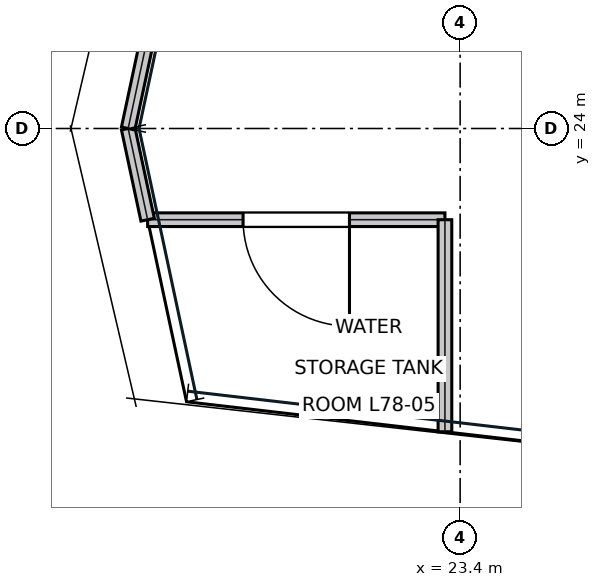
"""IFC4 building model, lengths in metres.
Left out: names, types, materials, properties, quantities, classifications, styles, units other than length and angle.
Written with IfcOpenShell. Run it as: python <this file> out.ifc"""

import sys

from ifc_helpers import new_model, si_unit, direction, frame, frame_2d, origin, place, context, subcontext, project, spatial, rectangle, extrude, element, fill, save


model = new_model("IFC4")
c1 = context("Model", 3, precision=1e-05, world=origin(), true_north=direction((0.0, 1.0)))
c2 = subcontext(c1, "Body", "Model", "MODEL_VIEW")
j1 = project(units=[si_unit("LENGTHUNIT", "METRE"), si_unit("PLANEANGLEUNIT", "RADIAN")], contexts=[c1])
p1 = place(None, origin())
s1 = spatial("IfcSite", under=j1, at=p1, CompositionType="ELEMENT")
p2 = place(p1, origin())
s2 = spatial("IfcBuilding", under=s1, at=p2, CompositionType="ELEMENT")
p3 = place(p2, frame((0.0, 0.0, 332.4)))
s3 = spatial("IfcBuildingStorey", under=s2, at=p3, CompositionType="ELEMENT", Elevation=332.4)
p4 = place(p3, frame((19.288, 22.8, 0.0), z_axis=(0.0, 0.0, 1.0), x_axis=(1.0, 0.0, 0.0)))
e1 = element("IfcWall", 1, at=p4, inside=s3, PredefinedType="SOLIDWALL", context=c2, shape_type="SweptSolid", body=[
    extrude(rectangle(XDim=3.912, YDim=0.18, at=frame_2d((1.956, 0.0))), origin(), (0.0, 0.0, 1.0), 3.91),
])
p5 = place(p4, frame((1.256, 0.0, 0.0)))
e2 = element("IfcOpeningElement", 2, at=p5, cuts=e1, PredefinedType="OPENING", context=c2, shape_type="SweptSolid", body=[
    extrude(rectangle(XDim=1.4, YDim=2.2, at=frame_2d((0.7, 1.1))), frame((0.0, 0.1, 0.0), z_axis=(0.0, -1.0, 0.0), x_axis=(1.0, 0.0, 0.0)), (0.0, 0.0, 1.0), 0.2),
])
p6 = place(p3, frame((23.2, 20.01, 0.0), z_axis=(0.0, 0.0, 1.0), x_axis=(0.0, 1.0, 0.0)))
e3 = element("IfcWall", 3, at=p6, inside=s3, PredefinedType="SOLIDWALL", context=c2, shape_type="SweptSolid", body=[
    extrude(rectangle(XDim=2.79, YDim=0.18, at=frame_2d((1.395, 0.0))), origin(), (0.0, 0.0, 1.0), 3.64),
])
for number, where, z_axis, x_axis in (
    (4, (19.032, 24.0, 0.0), (0.0, 0.0, 1.0), (0.209, -0.978, 0.0)),
    (5, (19.032, 24.0, 0.0), (0.0, 0.0, 1.0), (0.209, 0.978, 0.0)),
):
    element("IfcWall", number, at=place(p3, frame(where, z_axis=z_axis, x_axis=x_axis)), inside=s3, PredefinedType="SOLIDWALL", context=c2, shape_type="SweptSolid", body=[
        extrude(rectangle(XDim=1.227, YDim=0.18, at=frame_2d((0.614, 0.0))), origin(), (0.0, 0.0, 1.0), 4.18),
    ])
p7 = place(p5, frame((1.4, 0.0, 0.0), z_axis=(0.0, 0.0, 1.0), x_axis=(-1.0, 0.0, 0.0)))
e6 = element("IfcDoor", 6, at=p7, inside=s3, OperationType="SINGLE_SWING_LEFT", PredefinedType="DOOR", context=c2, shape_type="SweptSolid", body=[
    extrude(rectangle(XDim=1.4, YDim=2.2, at=frame_2d((0.7, 1.1))), frame((0.0, 0.025, 0.0), z_axis=(0.0, -1.0, 0.0), x_axis=(1.0, 0.0, 0.0)), (0.0, 0.0, 1.0), 0.05),
])
fill(e2, e6)
save(model, sys.argv[1])
